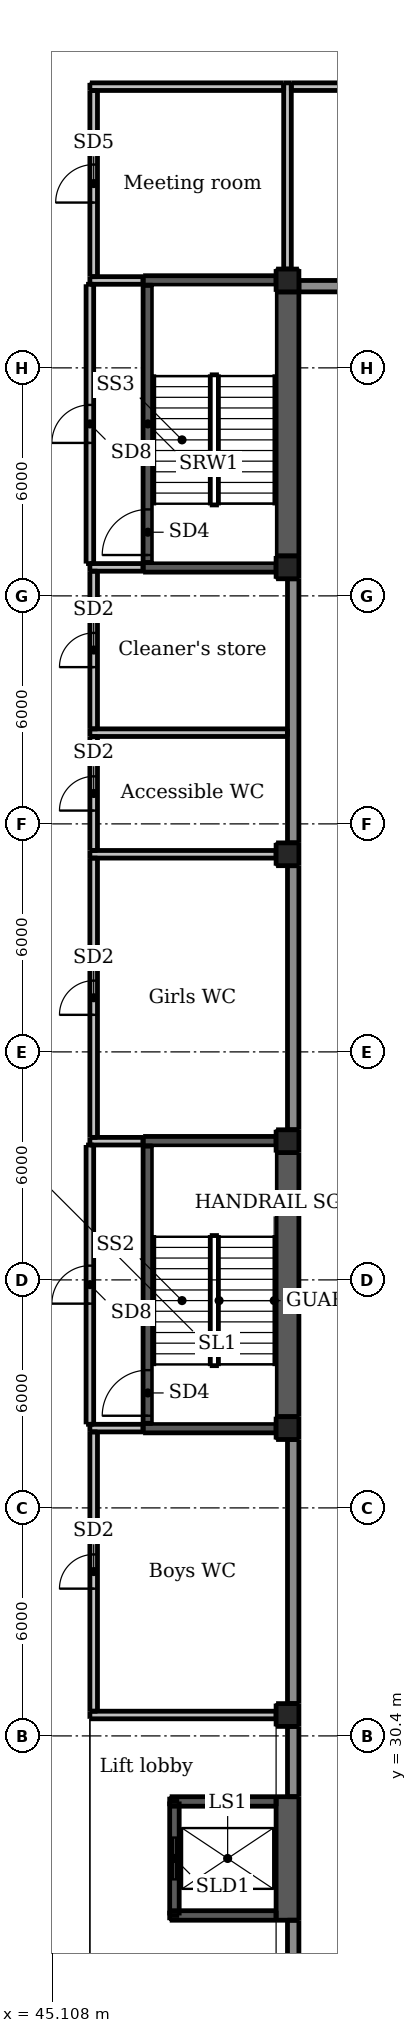
"""IFC4 building model, lengths in metres.
Left out: names, types, materials, properties, quantities, classifications, styles, units other than length and angle.
Written with IfcOpenShell. Run it as: python <this file> out.ifc"""

import sys

from ifc_helpers import new_model, si_unit, direction, frame, frame_2d, origin, origin_2d, place, context, subcontext, project, spatial, rectangle, extrude, element, fill, save


model = new_model("IFC4")
c1 = context("Model", 3, precision=1e-05, world=origin(), true_north=direction((0.0, 1.0)))
c2 = subcontext(c1, "Body", "Model", "MODEL_VIEW")
j1 = project(units=[si_unit("LENGTHUNIT", "METRE"), si_unit("PLANEANGLEUNIT", "RADIAN")], contexts=[c1])
p1 = place(None, origin())
s1 = spatial("IfcSite", under=j1, at=p1, CompositionType="ELEMENT")
p2 = place(p1, origin())
s2 = spatial("IfcBuilding", under=s1, at=p2, CompositionType="ELEMENT")
p3 = place(p2, frame((0.0, 0.0, 14.5)))
s3 = spatial("IfcBuildingStorey", under=s2, at=p3, CompositionType="ELEMENT", Elevation=14.5)
for number, where, z_axis, x_axis in (
    (1, (52.6, 30.4, 0.0), (0.0, 0.0, 1.0), (1.0, 0.0, 0.0)),
    (2, (52.6, 36.4, 0.0), (0.0, 0.0, 1.0), (1.0, 0.0, 0.0)),
    (3, (52.6, 42.4, 0.0), (0.0, 0.0, 1.0), (1.0, 0.0, 0.0)),
    (4, (52.6, 48.4, 0.0), (0.0, 0.0, 1.0), (1.0, 0.0, 0.0)),
    (5, (52.6, 54.4, 0.0), (0.0, 0.0, 1.0), (1.0, 0.0, 0.0)),
    (6, (52.6, 60.4, 0.0), (0.0, 0.0, 1.0), (1.0, 0.0, 0.0)),
):
    element("IfcColumn", number, at=place(p3, frame(where, z_axis=z_axis, x_axis=x_axis)), inside=s3, PredefinedType="COLUMN", context=c2, shape_type="SweptSolid", body=[
        extrude(rectangle(XDim=1.2, YDim=1.2, at=origin_2d()), origin(), (0.0, 0.0, 1.0), 4.2),
    ])
for number, where, z_axis, x_axis in (
    (7, (51.3, 30.95, -0.3), (0.0, 0.0, 1.0), (1.0, 0.0, 0.0)),
    (8, (51.3, 38.5, -0.3), (0.0, 0.0, 1.0), (1.0, 0.0, 0.0)),
    (9, (51.3, 46.05, -0.3), (0.0, 0.0, 1.0), (1.0, 0.0, 0.0)),
    (10, (51.3, 53.6, -0.3), (0.0, 0.0, 1.0), (1.0, 0.0, 0.0)),
    (11, (51.3, 61.15, -0.3), (0.0, 0.0, 1.0), (1.0, 0.0, 0.0)),
    (12, (51.3, 68.7, -0.3), (0.0, 0.0, 1.0), (1.0, 0.0, 0.0)),
):
    element("IfcColumn", number, at=place(p3, frame(where, z_axis=z_axis, x_axis=x_axis)), inside=s3, PredefinedType="COLUMN", context=c2, shape_type="SweptSolid", body=[
        extrude(rectangle(XDim=0.6, YDim=0.6, at=origin_2d()), origin(), (0.0, 0.0, 1.0), 4.5),
    ])
p4 = place(p3, frame((47.625, 38.625, -0.3), z_axis=(0.0, 0.0, 1.0), x_axis=(0.0, 1.0, 0.0)))
e13 = element("IfcWall", 13, at=p4, inside=s3, PredefinedType="SHEAR", context=c2, shape_type="SweptSolid", body=[
    extrude(rectangle(XDim=7.3, YDim=0.25, at=frame_2d((3.65, 0.0))), origin(), (0.0, 0.0, 1.0), 4.5),
])
p5 = place(p4, frame((0.2, 0.0, 0.3)))
e14 = element("IfcOpeningElement", 14, at=p5, cuts=e13, PredefinedType="OPENING", context=c2, shape_type="SweptSolid", body=[
    extrude(rectangle(XDim=1.2, YDim=2.1, at=frame_2d((0.6, 1.05))), frame((0.0, 0.135, 0.0), z_axis=(0.0, -1.0, 0.0), x_axis=(1.0, 0.0, 0.0)), (0.0, 0.0, 1.0), 0.27),
])
for number, where, z_axis, x_axis in (
    (15, (47.5, 38.5, -0.3), (0.0, 0.0, 1.0), (1.0, 0.0, 0.0)),
    (16, (47.5, 46.05, -0.3), (0.0, 0.0, 1.0), (1.0, 0.0, 0.0)),
):
    element("IfcWall", number, at=place(p3, frame(where, z_axis=z_axis, x_axis=x_axis)), inside=s3, PredefinedType="SHEAR", context=c2, shape_type="SweptSolid", body=[
        extrude(rectangle(XDim=3.5, YDim=0.25, at=frame_2d((1.75, 0.0))), origin(), (0.0, 0.0, 1.0), 4.5),
    ])
p6 = place(p3, frame((51.3, 38.8, -0.3), z_axis=(0.0, 0.0, 1.0), x_axis=(0.0, 1.0, 0.0)))
e17 = element("IfcWall", 17, at=p6, inside=s3, PredefinedType="SHEAR", context=c2, shape_type="SweptSolid", body=[
    extrude(rectangle(XDim=6.95, YDim=0.6, at=frame_2d((3.475, 0.0))), origin(), (0.0, 0.0, 1.0), 4.5),
])
p7 = place(p3, frame((47.625, 61.275, -0.3), z_axis=(0.0, 0.0, 1.0), x_axis=(0.0, 1.0, 0.0)))
e18 = element("IfcWall", 18, at=p7, inside=s3, PredefinedType="SHEAR", context=c2, shape_type="SweptSolid", body=[
    extrude(rectangle(XDim=7.3, YDim=0.25, at=frame_2d((3.65, 0.0))), origin(), (0.0, 0.0, 1.0), 4.5),
])
p8 = place(p7, frame((0.2, 0.0, 0.3)))
e19 = element("IfcOpeningElement", 19, at=p8, cuts=e18, PredefinedType="OPENING", context=c2, shape_type="SweptSolid", body=[
    extrude(rectangle(XDim=1.2, YDim=2.1, at=frame_2d((0.6, 1.05))), frame((0.0, 0.135, 0.0), z_axis=(0.0, -1.0, 0.0), x_axis=(1.0, 0.0, 0.0)), (0.0, 0.0, 1.0), 0.27),
])
for number, where, z_axis, x_axis in (
    (20, (47.5, 61.15, -0.3), (0.0, 0.0, 1.0), (1.0, 0.0, 0.0)),
    (21, (47.5, 68.7, -0.3), (0.0, 0.0, 1.0), (1.0, 0.0, 0.0)),
):
    element("IfcWall", number, at=place(p3, frame(where, z_axis=z_axis, x_axis=x_axis)), inside=s3, PredefinedType="SHEAR", context=c2, shape_type="SweptSolid", body=[
        extrude(rectangle(XDim=3.5, YDim=0.25, at=frame_2d((1.75, 0.0))), origin(), (0.0, 0.0, 1.0), 4.5),
    ])
p9 = place(p3, frame((51.3, 61.45, -0.3), z_axis=(0.0, 0.0, 1.0), x_axis=(0.0, 1.0, 0.0)))
e22 = element("IfcWall", 22, at=p9, inside=s3, PredefinedType="SHEAR", context=c2, shape_type="SweptSolid", body=[
    extrude(rectangle(XDim=6.95, YDim=0.6, at=frame_2d((3.475, 0.0))), origin(), (0.0, 0.0, 1.0), 4.5),
])
p10 = place(p3, frame((48.325, 25.675, -0.3), z_axis=(0.0, 0.0, 1.0), x_axis=(0.0, 1.0, 0.0)))
e23 = element("IfcWall", 23, at=p10, inside=s3, PredefinedType="SHEAR", context=c2, shape_type="SweptSolid", body=[
    extrude(rectangle(XDim=3.0, YDim=0.25, at=frame_2d((1.5, 0.0))), origin(), (0.0, 0.0, 1.0), 4.5),
])
p11 = place(p10, frame((0.95, 0.0, 0.3)))
e24 = element("IfcOpeningElement", 24, at=p11, cuts=e23, PredefinedType="OPENING", context=c2, shape_type="SweptSolid", body=[
    extrude(rectangle(XDim=1.1, YDim=2.1, at=frame_2d((0.55, 1.05))), frame((0.0, 0.135, 0.0), z_axis=(0.0, -1.0, 0.0), x_axis=(1.0, 0.0, 0.0)), (0.0, 0.0, 1.0), 0.27),
])
for number, where, z_axis, x_axis in (
    (25, (48.2, 25.675, -0.3), (0.0, 0.0, 1.0), (1.0, 0.0, 0.0)),
    (26, (48.2, 28.675, -0.3), (0.0, 0.0, 1.0), (1.0, 0.0, 0.0)),
):
    element("IfcWall", number, at=place(p3, frame(where, z_axis=z_axis, x_axis=x_axis)), inside=s3, PredefinedType="SHEAR", context=c2, shape_type="SweptSolid", body=[
        extrude(rectangle(XDim=2.8, YDim=0.25, at=frame_2d((1.4, 0.0))), origin(), (0.0, 0.0, 1.0), 4.5),
    ])
p12 = place(p3, frame((51.3, 25.55, -0.3), z_axis=(0.0, 0.0, 1.0), x_axis=(0.0, 1.0, 0.0)))
e27 = element("IfcWall", 27, at=p12, inside=s3, PredefinedType="SHEAR", context=c2, shape_type="SweptSolid", body=[
    extrude(rectangle(XDim=3.25, YDim=0.6, at=frame_2d((1.625, 0.0))), origin(), (0.0, 0.0, 1.0), 4.5),
])
p13 = place(p3, frame((52.0, 67.875, 0.0), z_axis=(0.0, 0.0, 1.0), x_axis=(1.0, 0.0, 0.0)))
e28 = element("IfcWall", 28, at=p13, inside=s3, PredefinedType="SOLIDWALL", context=c2, shape_type="SweptSolid", body=[
    extrude(rectangle(XDim=7.0, YDim=0.25, at=frame_2d((3.5, 0.0))), origin(), (0.0, 0.0, 1.0), 4.2),
])
p14 = place(p3, frame((52.125, 20.0, 0.0), z_axis=(0.0, 0.0, 1.0), x_axis=(0.0, 1.0, 0.0)))
e29 = element("IfcWall", 29, at=p14, inside=s3, PredefinedType="SOLIDWALL", context=c2, shape_type="SweptSolid", body=[
    extrude(rectangle(XDim=9.8, YDim=0.25, at=frame_2d((4.9, 0.0))), origin(), (0.0, 0.0, 1.0), 4.2),
])
for number, where, z_axis, x_axis in (
    (30, (52.125, 31.0, 0.0), (0.0, 0.0, 1.0), (0.0, 1.0, 0.0)),
    (31, (52.125, 37.0, 0.0), (0.0, 0.0, 1.0), (0.0, 1.0, 0.0)),
    (32, (52.125, 43.0, 0.0), (0.0, 0.0, 1.0), (0.0, 1.0, 0.0)),
    (33, (52.125, 49.0, 0.0), (0.0, 0.0, 1.0), (0.0, 1.0, 0.0)),
    (34, (52.125, 55.0, 0.0), (0.0, 0.0, 1.0), (0.0, 1.0, 0.0)),
):
    element("IfcWall", number, at=place(p3, frame(where, z_axis=z_axis, x_axis=x_axis)), inside=s3, PredefinedType="SOLIDWALL", context=c2, shape_type="SweptSolid", body=[
        extrude(rectangle(XDim=4.8, YDim=0.25, at=frame_2d((2.4, 0.0))), origin(), (0.0, 0.0, 1.0), 4.2),
    ])
p15 = place(p3, frame((52.125, 61.0, 0.0), z_axis=(0.0, 0.0, 1.0), x_axis=(0.0, 1.0, 0.0)))
e35 = element("IfcWall", 35, at=p15, inside=s3, PredefinedType="SOLIDWALL", context=c2, shape_type="SweptSolid", body=[
    extrude(rectangle(XDim=7.0, YDim=0.25, at=frame_2d((3.5, 0.0))), origin(), (0.0, 0.0, 1.0), 4.2),
])
for number, where, z_axis, x_axis in (
    (36, (51.45, 31.25, 0.0), (0.0, 0.0, 1.0), (0.0, 1.0, 0.0)),
    (37, (51.45, 46.35, 0.0), (0.0, 0.0, 1.0), (0.0, 1.0, 0.0)),
):
    element("IfcWall", number, at=place(p3, frame(where, z_axis=z_axis, x_axis=x_axis)), inside=s3, PredefinedType="SOLIDWALL", context=c2, shape_type="SweptSolid", body=[
        extrude(rectangle(XDim=6.95, YDim=0.3, at=frame_2d((3.475, 0.0))), origin(), (0.0, 0.0, 1.0), 3.3),
    ])
p16 = place(p3, frame((51.45, 53.9, 0.0), z_axis=(0.0, 0.0, 1.0), x_axis=(0.0, 1.0, 0.0)))
e38 = element("IfcWall", 38, at=p16, inside=s3, PredefinedType="SOLIDWALL", context=c2, shape_type="SweptSolid", body=[
    extrude(rectangle(XDim=6.95, YDim=0.3, at=frame_2d((3.475, 0.0))), origin(), (0.0, 0.0, 1.0), 3.3),
])
p17 = place(p3, frame((51.6, 68.55, 0.0), z_axis=(0.0, 0.0, 1.0), x_axis=(1.0, 0.0, 0.0)))
e39 = element("IfcWall", 39, at=p17, inside=s3, PredefinedType="SOLIDWALL", context=c2, shape_type="SweptSolid", body=[
    extrude(rectangle(XDim=7.467, YDim=0.3, at=frame_2d((3.733, 0.0))), origin(), (0.0, 0.0, 1.0), 3.3),
])
p18 = place(p3, frame((51.45, 23.7, 0.0), z_axis=(0.0, 0.0, 1.0), x_axis=(0.0, 1.0, 0.0)))
e40 = element("IfcWall", 40, at=p18, inside=s3, PredefinedType="SOLIDWALL", context=c2, shape_type="SweptSolid", body=[
    extrude(rectangle(XDim=1.85, YDim=0.3, at=frame_2d((0.925, 0.0))), origin(), (0.0, 0.0, 1.0), 3.3),
])
p19 = place(p3, frame((51.45, 28.8, 0.0), z_axis=(0.0, 0.0, 1.0), x_axis=(0.0, 1.0, 0.0)))
e41 = element("IfcWall", 41, at=p19, inside=s3, PredefinedType="SOLIDWALL", context=c2, shape_type="SweptSolid", body=[
    extrude(rectangle(XDim=1.85, YDim=0.3, at=frame_2d((0.925, 0.0))), origin(), (0.0, 0.0, 1.0), 3.3),
])
p20 = place(p3, frame((46.2, 31.05, 0.0), z_axis=(0.0, 0.0, 1.0), x_axis=(0.0, 1.0, 0.0)))
e42 = element("IfcWall", 42, at=p20, inside=s3, PredefinedType="PARTITIONING", context=c2, shape_type="SweptSolid", body=[
    extrude(rectangle(XDim=7.35, YDim=0.2, at=frame_2d((3.675, 0.0))), origin(), (0.0, 0.0, 1.0), 3.1),
])
p21 = place(p20, frame((3.225, 0.0, 0.0)))
e43 = element("IfcOpeningElement", 43, at=p21, cuts=e42, PredefinedType="OPENING", context=c2, shape_type="SweptSolid", body=[
    extrude(rectangle(XDim=0.9, YDim=2.1, at=frame_2d((0.45, 1.05))), frame((0.0, 0.11, 0.0), z_axis=(0.0, -1.0, 0.0), x_axis=(1.0, 0.0, 0.0)), (0.0, 0.0, 1.0), 0.22),
])
p22 = place(p3, frame((46.2, 46.15, 0.0), z_axis=(0.0, 0.0, 1.0), x_axis=(0.0, 1.0, 0.0)))
e44 = element("IfcWall", 44, at=p22, inside=s3, PredefinedType="PARTITIONING", context=c2, shape_type="SweptSolid", body=[
    extrude(rectangle(XDim=7.35, YDim=0.2, at=frame_2d((3.675, 0.0))), origin(), (0.0, 0.0, 1.0), 3.1),
])
p23 = place(p22, frame((3.225, 0.0, 0.0)))
e45 = element("IfcOpeningElement", 45, at=p23, cuts=e44, PredefinedType="OPENING", context=c2, shape_type="SweptSolid", body=[
    extrude(rectangle(XDim=0.9, YDim=2.1, at=frame_2d((0.45, 1.05))), frame((0.0, 0.11, 0.0), z_axis=(0.0, -1.0, 0.0), x_axis=(1.0, 0.0, 0.0)), (0.0, 0.0, 1.0), 0.22),
])
p24 = place(p3, frame((46.2, 53.7, 0.0), z_axis=(0.0, 0.0, 1.0), x_axis=(0.0, 1.0, 0.0)))
e46 = element("IfcWall", 46, at=p24, inside=s3, PredefinedType="PARTITIONING", context=c2, shape_type="SweptSolid", body=[
    extrude(rectangle(XDim=3.0, YDim=0.2, at=frame_2d((1.5, 0.0))), origin(), (0.0, 0.0, 1.0), 3.1),
])
p25 = place(p24, frame((1.05, 0.0, 0.0)))
e47 = element("IfcOpeningElement", 47, at=p25, cuts=e46, PredefinedType="OPENING", context=c2, shape_type="SweptSolid", body=[
    extrude(rectangle(XDim=0.9, YDim=2.1, at=frame_2d((0.45, 1.05))), frame((0.0, 0.11, 0.0), z_axis=(0.0, -1.0, 0.0), x_axis=(1.0, 0.0, 0.0)), (0.0, 0.0, 1.0), 0.22),
])
p26 = place(p3, frame((46.2, 56.9, 0.0), z_axis=(0.0, 0.0, 1.0), x_axis=(0.0, 1.0, 0.0)))
e48 = element("IfcWall", 48, at=p26, inside=s3, PredefinedType="PARTITIONING", context=c2, shape_type="SweptSolid", body=[
    extrude(rectangle(XDim=4.15, YDim=0.2, at=frame_2d((2.075, 0.0))), origin(), (0.0, 0.0, 1.0), 3.1),
])
p27 = place(p26, frame((1.625, 0.0, 0.0)))
e49 = element("IfcOpeningElement", 49, at=p27, cuts=e48, PredefinedType="OPENING", context=c2, shape_type="SweptSolid", body=[
    extrude(rectangle(XDim=0.9, YDim=2.1, at=frame_2d((0.45, 1.05))), frame((0.0, 0.11, 0.0), z_axis=(0.0, -1.0, 0.0), x_axis=(1.0, 0.0, 0.0)), (0.0, 0.0, 1.0), 0.22),
])
p28 = place(p3, frame((46.2, 68.8, 0.0), z_axis=(0.0, 0.0, 1.0), x_axis=(0.0, 1.0, 0.0)))
e50 = element("IfcWall", 50, at=p28, inside=s3, PredefinedType="PARTITIONING", context=c2, shape_type="SweptSolid", body=[
    extrude(rectangle(XDim=4.9, YDim=0.2, at=frame_2d((2.45, 0.0))), origin(), (0.0, 0.0, 1.0), 3.1),
])
p29 = place(p28, frame((1.95, 0.0, 0.0)))
e51 = element("IfcOpeningElement", 51, at=p29, cuts=e50, PredefinedType="OPENING", context=c2, shape_type="SweptSolid", body=[
    extrude(rectangle(XDim=1.0, YDim=2.1, at=frame_2d((0.5, 1.05))), frame((0.0, 0.11, 0.0), z_axis=(0.0, -1.0, 0.0), x_axis=(1.0, 0.0, 0.0)), (0.0, 0.0, 1.0), 0.22),
])
p30 = place(p3, frame((46.1, 30.95, 0.0), z_axis=(0.0, 0.0, 1.0), x_axis=(1.0, 0.0, 0.0)))
e52 = element("IfcWall", 52, at=p30, inside=s3, PredefinedType="PARTITIONING", context=c2, shape_type="SweptSolid", body=[
    extrude(rectangle(XDim=4.9, YDim=0.2, at=frame_2d((2.45, 0.0))), origin(), (0.0, 0.0, 1.0), 3.1),
])
for number, where, z_axis, x_axis in (
    (53, (46.1, 38.5, 0.0), (0.0, 0.0, 1.0), (1.0, 0.0, 0.0)),
    (54, (46.1, 46.05, 0.0), (0.0, 0.0, 1.0), (1.0, 0.0, 0.0)),
):
    element("IfcWall", number, at=place(p3, frame(where, z_axis=z_axis, x_axis=x_axis)), inside=s3, PredefinedType="PARTITIONING", context=c2, shape_type="SweptSolid", body=[
        extrude(rectangle(XDim=1.4, YDim=0.2, at=frame_2d((0.7, 0.0))), origin(), (0.0, 0.0, 1.0), 3.1),
    ])
p31 = place(p3, frame((46.1, 53.6, 0.0), z_axis=(0.0, 0.0, 1.0), x_axis=(1.0, 0.0, 0.0)))
e55 = element("IfcWall", 55, at=p31, inside=s3, PredefinedType="PARTITIONING", context=c2, shape_type="SweptSolid", body=[
    extrude(rectangle(XDim=4.9, YDim=0.2, at=frame_2d((2.45, 0.0))), origin(), (0.0, 0.0, 1.0), 3.1),
])
for number, where, z_axis, x_axis in (
    (56, (46.1, 61.15, 0.0), (0.0, 0.0, 1.0), (1.0, 0.0, 0.0)),
    (57, (46.1, 68.7, 0.0), (0.0, 0.0, 1.0), (1.0, 0.0, 0.0)),
):
    element("IfcWall", number, at=place(p3, frame(where, z_axis=z_axis, x_axis=x_axis)), inside=s3, PredefinedType="PARTITIONING", context=c2, shape_type="SweptSolid", body=[
        extrude(rectangle(XDim=1.4, YDim=0.2, at=frame_2d((0.7, 0.0))), origin(), (0.0, 0.0, 1.0), 3.1),
    ])
p32 = place(p3, frame((46.1, 56.8, 0.0), z_axis=(0.0, 0.0, 1.0), x_axis=(1.0, 0.0, 0.0)))
e58 = element("IfcWall", 58, at=p32, inside=s3, PredefinedType="PARTITIONING", context=c2, shape_type="SweptSolid", body=[
    extrude(rectangle(XDim=5.2, YDim=0.2, at=frame_2d((2.6, 0.0))), origin(), (0.0, 0.0, 1.0), 3.1),
])
p33 = place(p3, frame((51.4, 73.8, 0.0), z_axis=(0.0, 0.0, 1.0), x_axis=(1.0, 0.0, 0.0)))
e59 = element("IfcWall", 59, at=p33, inside=s3, PredefinedType="PARTITIONING", context=c2, shape_type="SweptSolid", body=[
    extrude(rectangle(XDim=7.867, YDim=0.2, at=frame_2d((3.934, 0.0))), origin(), (0.0, 0.0, 1.0), 3.1),
])
p34 = place(p33, frame((3.434, 0.0, 0.0)))
e60 = element("IfcOpeningElement", 60, at=p34, cuts=e59, PredefinedType="OPENING", context=c2, shape_type="SweptSolid", body=[
    extrude(rectangle(XDim=1.0, YDim=2.1, at=frame_2d((0.5, 1.05))), frame((0.0, 0.11, 0.0), z_axis=(0.0, -1.0, 0.0), x_axis=(1.0, 0.0, 0.0)), (0.0, 0.0, 1.0), 0.22),
])
p35 = place(p3, frame((46.1, 73.8, 0.0), z_axis=(0.0, 0.0, 1.0), x_axis=(1.0, 0.0, 0.0)))
e61 = element("IfcWall", 61, at=p35, inside=s3, PredefinedType="PARTITIONING", context=c2, shape_type="SweptSolid", body=[
    extrude(rectangle(XDim=5.1, YDim=0.2, at=frame_2d((2.55, 0.0))), origin(), (0.0, 0.0, 1.0), 3.1),
])
p36 = place(p3, frame((51.3, 69.0, 0.0), z_axis=(0.0, 0.0, 1.0), x_axis=(0.0, 1.0, 0.0)))
e62 = element("IfcWall", 62, at=p36, inside=s3, PredefinedType="PARTITIONING", context=c2, shape_type="SweptSolid", body=[
    extrude(rectangle(XDim=4.9, YDim=0.2, at=frame_2d((2.45, 0.0))), origin(), (0.0, 0.0, 1.0), 3.1),
])
p37 = place(p3, frame((46.1, 38.6, 0.0), z_axis=(0.0, 0.0, 1.0), x_axis=(0.0, 1.0, 0.0)))
e63 = element("IfcWall", 63, at=p37, inside=s3, PredefinedType="PARTITIONING", context=c2, shape_type="SweptSolid", body=[
    extrude(rectangle(XDim=7.35, YDim=0.2, at=frame_2d((3.675, 0.0))), origin(), (0.0, 0.0, 1.0), 3.1),
])
p38 = place(p37, frame((3.175, 0.0, 0.0)))
e64 = element("IfcOpeningElement", 64, at=p38, cuts=e63, PredefinedType="OPENING", context=c2, shape_type="SweptSolid", body=[
    extrude(rectangle(XDim=1.0, YDim=2.1, at=frame_2d((0.5, 1.05))), frame((0.0, 0.11, 0.0), z_axis=(0.0, -1.0, 0.0), x_axis=(1.0, 0.0, 0.0)), (0.0, 0.0, 1.0), 0.22),
])
p39 = place(p3, frame((46.1, 61.25, 0.0), z_axis=(0.0, 0.0, 1.0), x_axis=(0.0, 1.0, 0.0)))
e65 = element("IfcWall", 65, at=p39, inside=s3, PredefinedType="PARTITIONING", context=c2, shape_type="SweptSolid", body=[
    extrude(rectangle(XDim=7.35, YDim=0.2, at=frame_2d((3.675, 0.0))), origin(), (0.0, 0.0, 1.0), 3.1),
])
p40 = place(p39, frame((3.175, 0.0, 0.0)))
e66 = element("IfcOpeningElement", 66, at=p40, cuts=e65, PredefinedType="OPENING", context=c2, shape_type="SweptSolid", body=[
    extrude(rectangle(XDim=1.0, YDim=2.1, at=frame_2d((0.5, 1.05))), frame((0.0, 0.11, 0.0), z_axis=(0.0, -1.0, 0.0), x_axis=(1.0, 0.0, 0.0)), (0.0, 0.0, 1.0), 0.22),
])
p41 = place(p21, origin())
e67 = element("IfcDoor", 67, at=p41, inside=s3, OperationType="SINGLE_SWING_LEFT", PredefinedType="DOOR", context=c2, shape_type="SweptSolid", body=[
    extrude(rectangle(XDim=0.9, YDim=2.1, at=frame_2d((0.45, 1.05))), frame((0.0, 0.025, 0.0), z_axis=(0.0, -1.0, 0.0), x_axis=(1.0, 0.0, 0.0)), (0.0, 0.0, 1.0), 0.05),
])
fill(e43, e67)
p42 = place(p23, origin())
e68 = element("IfcDoor", 68, at=p42, inside=s3, OperationType="SINGLE_SWING_LEFT", PredefinedType="DOOR", context=c2, shape_type="SweptSolid", body=[
    extrude(rectangle(XDim=0.9, YDim=2.1, at=frame_2d((0.45, 1.05))), frame((0.0, 0.025, 0.0), z_axis=(0.0, -1.0, 0.0), x_axis=(1.0, 0.0, 0.0)), (0.0, 0.0, 1.0), 0.05),
])
fill(e45, e68)
p43 = place(p25, origin())
e69 = element("IfcDoor", 69, at=p43, inside=s3, OperationType="SINGLE_SWING_LEFT", PredefinedType="DOOR", context=c2, shape_type="SweptSolid", body=[
    extrude(rectangle(XDim=0.9, YDim=2.1, at=frame_2d((0.45, 1.05))), frame((0.0, 0.025, 0.0), z_axis=(0.0, -1.0, 0.0), x_axis=(1.0, 0.0, 0.0)), (0.0, 0.0, 1.0), 0.05),
])
fill(e47, e69)
p44 = place(p27, origin())
e70 = element("IfcDoor", 70, at=p44, inside=s3, OperationType="SINGLE_SWING_LEFT", PredefinedType="DOOR", context=c2, shape_type="SweptSolid", body=[
    extrude(rectangle(XDim=0.9, YDim=2.1, at=frame_2d((0.45, 1.05))), frame((0.0, 0.025, 0.0), z_axis=(0.0, -1.0, 0.0), x_axis=(1.0, 0.0, 0.0)), (0.0, 0.0, 1.0), 0.05),
])
fill(e49, e70)
p45 = place(p29, origin())
e71 = element("IfcDoor", 71, at=p45, inside=s3, OperationType="SINGLE_SWING_LEFT", PredefinedType="DOOR", context=c2, shape_type="SweptSolid", body=[
    extrude(rectangle(XDim=1.0, YDim=2.1, at=frame_2d((0.5, 1.05))), frame((0.0, 0.025, 0.0), z_axis=(0.0, -1.0, 0.0), x_axis=(1.0, 0.0, 0.0)), (0.0, 0.0, 1.0), 0.05),
])
fill(e51, e71)
p46 = place(p38, origin())
e72 = element("IfcDoor", 72, at=p46, inside=s3, OperationType="SINGLE_SWING_LEFT", PredefinedType="DOOR", context=c2, shape_type="SweptSolid", body=[
    extrude(rectangle(XDim=1.0, YDim=2.1, at=frame_2d((0.5, 1.05))), frame((0.0, 0.025, 0.0), z_axis=(0.0, -1.0, 0.0), x_axis=(1.0, 0.0, 0.0)), (0.0, 0.0, 1.0), 0.05),
])
fill(e64, e72)
p47 = place(p40, origin())
e73 = element("IfcDoor", 73, at=p47, inside=s3, OperationType="SINGLE_SWING_LEFT", PredefinedType="DOOR", context=c2, shape_type="SweptSolid", body=[
    extrude(rectangle(XDim=1.0, YDim=2.1, at=frame_2d((0.5, 1.05))), frame((0.0, 0.025, 0.0), z_axis=(0.0, -1.0, 0.0), x_axis=(1.0, 0.0, 0.0)), (0.0, 0.0, 1.0), 0.05),
])
fill(e66, e73)
p48 = place(p5, origin())
e74 = element("IfcDoor", 74, at=p48, inside=s3, OperationType="SINGLE_SWING_LEFT", PredefinedType="DOOR", context=c2, shape_type="SweptSolid", body=[
    extrude(rectangle(XDim=1.2, YDim=2.1, at=frame_2d((0.6, 1.05))), frame((0.0, 0.025, 0.0), z_axis=(0.0, -1.0, 0.0), x_axis=(1.0, 0.0, 0.0)), (0.0, 0.0, 1.0), 0.05),
])
fill(e14, e74)
p49 = place(p8, origin())
e75 = element("IfcDoor", 75, at=p49, inside=s3, OperationType="SINGLE_SWING_LEFT", PredefinedType="DOOR", context=c2, shape_type="SweptSolid", body=[
    extrude(rectangle(XDim=1.2, YDim=2.1, at=frame_2d((0.6, 1.05))), frame((0.0, 0.025, 0.0), z_axis=(0.0, -1.0, 0.0), x_axis=(1.0, 0.0, 0.0)), (0.0, 0.0, 1.0), 0.05),
])
fill(e19, e75)
p50 = place(p11, origin())
e76 = element("IfcDoor", 76, at=p50, inside=s3, OperationType="SLIDING_TO_LEFT", PredefinedType="DOOR", context=c2, shape_type="SweptSolid", body=[
    extrude(rectangle(XDim=1.1, YDim=2.1, at=frame_2d((0.55, 1.05))), frame((0.0, 0.025, 0.0), z_axis=(0.0, -1.0, 0.0), x_axis=(1.0, 0.0, 0.0)), (0.0, 0.0, 1.0), 0.05),
])
fill(e24, e76)
save(model, sys.argv[1])
